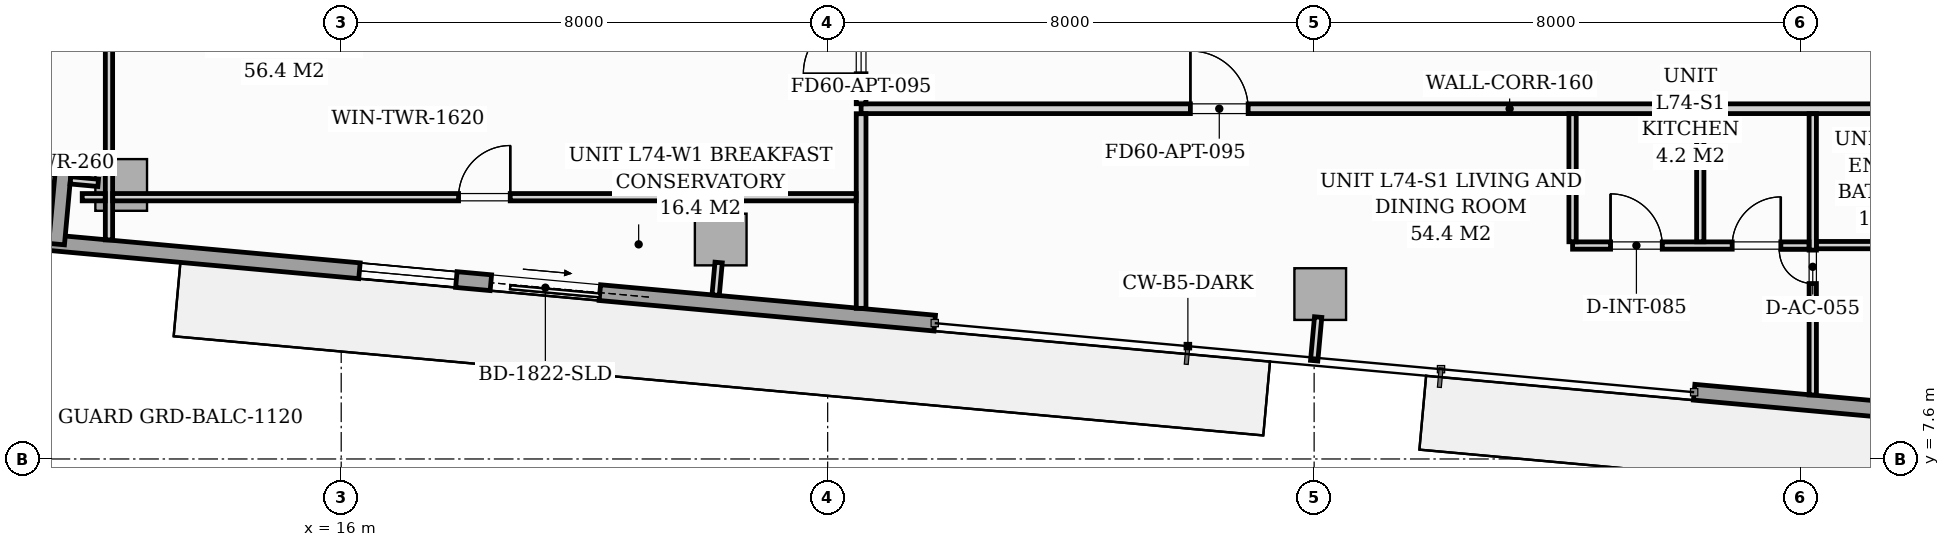
"""IFC4 building model, lengths in metres.
Left out: names, types, materials, properties, quantities, classifications, styles, units other than length and angle.
Written with IfcOpenShell. Run it as: python <this file> out.ifc"""

import sys

from ifc_helpers import new_model, si_unit, direction, frame, frame_2d, origin, origin_2d, place, context, subcontext, project, spatial, rectangle, extrude, source, transform, mapped, element, fill, save


model = new_model("IFC4")
c1 = context("Model", 3, precision=1e-05, world=origin(), true_north=direction((0.0, 1.0)))
c2 = subcontext(c1, "Body", "Model", "MODEL_VIEW")
j1 = project(units=[si_unit("LENGTHUNIT", "METRE"), si_unit("PLANEANGLEUNIT", "RADIAN")], contexts=[c1])
p1 = place(None, origin())
s1 = spatial("IfcSite", under=j1, at=p1, CompositionType="ELEMENT")
p2 = place(p1, origin())
s2 = spatial("IfcBuilding", under=s1, at=p2, CompositionType="ELEMENT")
p3 = place(p2, frame((0.0, 0.0, 256.2)))
s3 = spatial("IfcBuildingStorey", under=s2, at=p3, CompositionType="ELEMENT", Elevation=256.2)
m1 = source(origin(), c2, "Body", "SweptSolid", [
    extrude(rectangle(XDim=0.85, YDim=0.85, at=origin_2d()), origin(), (0.0, 0.0, 1.0), 3.294),
])
for number, where, z_axis, x_axis in (
    (1, (12.382, 12.106, 0.002), (0.0, 0.0, 1.0), (0.996, -0.091, 0.0)),
    (2, (22.241, 11.209, 0.002), (0.0, 0.0, 1.0), (0.996, -0.091, 0.0)),
    (3, (32.1, 10.312, 0.002), (0.0, 0.0, 1.0), (0.996, -0.091, 0.0)),
):
    element("IfcColumn", number, at=place(p3, frame(where, z_axis=z_axis, x_axis=x_axis)), inside=s3, PredefinedType="COLUMN", context=c2, shape_type="MappedRepresentation", body=[
        mapped(m1, transform((0.0, 0.0, 0.0), scale=1.0)),
    ])
p4 = place(p3, frame((11.319, 12.404, 0.0), z_axis=(0.0, 0.0, 1.0), x_axis=(-0.995881721538, 0.090661991521, 0.0)))
e4 = element("IfcWall", 4, at=p4, inside=s3, PredefinedType="STANDARD", context=c2, shape_type="SweptSolid", body=[
    extrude(rectangle(XDim=1.395, YDim=0.26, at=frame_2d((0.698, 0.0))), origin(), (0.0, 0.0, 1.0), 3.0),
])
p5 = place(p3, frame((52.819, 7.372, 0.0), z_axis=(0.0, 0.0, 1.0), x_axis=(-0.995884447498, 0.090632043071, 0.0)))
e5 = element("IfcWall", 5, at=p5, inside=s3, PredefinedType="STANDARD", context=c2, shape_type="SweptSolid", body=[
    extrude(rectangle(XDim=14.63, YDim=0.26, at=frame_2d((7.315, 0.0))), origin(), (0.0, 0.0, 1.0), 3.0),
])
p6 = place(p5, frame((7.471, 0.0, 0.0)))
e6 = element("IfcOpeningElement", 6, at=p6, cuts=e5, PredefinedType="OPENING", context=c2, shape_type="SweptSolid", body=[
    extrude(rectangle(XDim=1.8, YDim=2.06, at=frame_2d((0.9, 1.03))), frame((0.0, 0.14, 0.0), z_axis=(0.0, -1.0, 0.0), x_axis=(1.0, 0.0, 0.0)), (0.0, 0.0, 1.0), 0.28),
])
p7 = place(p5, frame((2.05, 0.0, 0.65)))
e7 = element("IfcOpeningElement", 7, at=p7, cuts=e5, PredefinedType="OPENING", context=c2, shape_type="SweptSolid", body=[
    extrude(rectangle(XDim=1.6, YDim=1.5, at=frame_2d((0.8, 0.75))), frame((0.0, 0.14, 0.0), z_axis=(0.0, -1.0, 0.0), x_axis=(1.0, 0.0, 0.0)), (0.0, 0.0, 1.0), 0.28),
])
p8 = place(p3, frame((25.761, 9.834, 0.0), z_axis=(0.0, 0.0, 1.0), x_axis=(-0.995884584572, 0.090630536861, 0.0)))
e8 = element("IfcWall", 8, at=p8, inside=s3, PredefinedType="STANDARD", context=c2, shape_type="SweptSolid", body=[
    extrude(rectangle(XDim=14.63, YDim=0.26, at=frame_2d((7.315, 0.0))), origin(), (0.0, 0.0, 1.0), 3.0),
])
p9 = place(p8, frame((5.53, 0.0, 0.0)))
e9 = element("IfcOpeningElement", 9, at=p9, cuts=e8, PredefinedType="OPENING", context=c2, shape_type="SweptSolid", body=[
    extrude(rectangle(XDim=1.8, YDim=2.06, at=frame_2d((0.9, 1.03))), frame((0.0, 0.14, 0.0), z_axis=(0.0, -1.0, 0.0), x_axis=(1.0, 0.0, 0.0)), (0.0, 0.0, 1.0), 0.28),
])
p10 = place(p8, frame((7.9, 0.0, 0.65)))
e10 = element("IfcOpeningElement", 10, at=p10, cuts=e8, PredefinedType="OPENING", context=c2, shape_type="SweptSolid", body=[
    extrude(rectangle(XDim=1.6, YDim=1.5, at=frame_2d((0.8, 0.75))), frame((0.0, 0.14, 0.0), z_axis=(0.0, -1.0, 0.0), x_axis=(1.0, 0.0, 0.0)), (0.0, 0.0, 1.0), 0.28),
])
p11 = place(p3, frame((11.319, 11.134, 0.0), z_axis=(0.0, 0.0, 1.0), x_axis=(0.090661991521, 0.995881721538, 0.0)))
e11 = element("IfcWall", 11, at=p11, inside=s3, PredefinedType="STANDARD", context=c2, shape_type="SweptSolid", body=[
    extrude(rectangle(XDim=1.395, YDim=0.26, at=frame_2d((0.698, 0.0))), origin(), (0.0, 0.0, 1.0), 3.0),
])
p12 = place(p3, frame((24.55, 13.36, 0.0), z_axis=(0.0, 0.0, 1.0), x_axis=(1.0, 0.0, 0.0)))
e12 = element("IfcWall", 12, at=p12, inside=s3, PredefinedType="PARTITIONING", context=c2, shape_type="SweptSolid", body=[
    extrude(rectangle(XDim=21.33, YDim=0.16, at=frame_2d((10.665, 0.0))), origin(), (0.0, 0.0, 1.0), 2.51),
])
p13 = place(p12, frame((5.415, 0.0, 0.0)))
e13 = element("IfcOpeningElement", 13, at=p13, cuts=e12, PredefinedType="OPENING", context=c2, shape_type="SweptSolid", body=[
    extrude(rectangle(XDim=0.95, YDim=2.06, at=frame_2d((0.475, 1.03))), frame((0.0, 0.09, 0.0), z_axis=(0.0, -1.0, 0.0), x_axis=(1.0, 0.0, 0.0)), (0.0, 0.0, 1.0), 0.18),
])
p14 = place(p3, frame((24.55, 10.077, 0.0), z_axis=(0.0, 0.0, 1.0), x_axis=(0.0, 1.0, 0.0)))
e14 = element("IfcWall", 14, at=p14, inside=s3, PredefinedType="PARTITIONING", context=c2, shape_type="SweptSolid", body=[
    extrude(rectangle(XDim=3.201, YDim=0.16, at=frame_2d((1.601, 0.0))), origin(), (0.0, 0.0, 1.0), 3.0),
])
p15 = place(p3, frame((24.55, 13.442, 0.0), z_axis=(0.0, 0.0, 1.0), x_axis=(0.0, 1.0, 0.0)))
e15 = element("IfcWall", 15, at=p15, inside=s3, PredefinedType="PARTITIONING", context=c2, shape_type="SweptSolid", body=[
    extrude(rectangle(XDim=7.208, YDim=0.16, at=frame_2d((3.604, 0.0))), origin(), (0.0, 0.0, 1.0), 3.0),
])
p16 = place(p15, frame((0.493, 0.0, 0.0)))
e16 = element("IfcOpeningElement", 16, at=p16, cuts=e15, PredefinedType="OPENING", context=c2, shape_type="SweptSolid", body=[
    extrude(rectangle(XDim=0.95, YDim=2.06, at=frame_2d((0.475, 1.03))), frame((0.0, 0.09, 0.0), z_axis=(0.0, -1.0, 0.0), x_axis=(1.0, 0.0, 0.0)), (0.0, 0.0, 1.0), 0.18),
])
p17 = place(p15, frame((5.949, 0.0, 0.0)))
e17 = element("IfcOpeningElement", 17, at=p17, cuts=e15, PredefinedType="OPENING", context=c2, shape_type="SweptSolid", body=[
    extrude(rectangle(XDim=0.95, YDim=2.06, at=frame_2d((0.475, 1.03))), frame((0.0, 0.09, 0.0), z_axis=(0.0, -1.0, 0.0), x_axis=(1.0, 0.0, 0.0)), (0.0, 0.0, 1.0), 0.18),
])
p18 = place(p3, frame((40.2, 8.653, 0.0), z_axis=(0.0, 0.0, 1.0), x_axis=(0.0, 1.0, 0.0)))
e18 = element("IfcWall", 18, at=p18, inside=s3, PredefinedType="PARTITIONING", context=c2, shape_type="SweptSolid", body=[
    extrude(rectangle(XDim=4.625, YDim=0.12, at=frame_2d((2.312, 0.0))), origin(), (0.0, 0.0, 1.0), 3.0),
])
p19 = place(p18, frame((1.832, 0.0, 0.0)))
e19 = element("IfcOpeningElement", 19, at=p19, cuts=e18, PredefinedType="OPENING", context=c2, shape_type="SweptSolid", body=[
    extrude(rectangle(XDim=0.55, YDim=2.0, at=frame_2d((0.275, 1.0))), frame((0.0, 0.07, 0.0), z_axis=(0.0, -1.0, 0.0), x_axis=(1.0, 0.0, 0.0)), (0.0, 0.0, 1.0), 0.14),
])
p20 = place(p3, frame((36.25, 11.11, 0.0), z_axis=(0.0, 0.0, 1.0), x_axis=(1.0, 0.0, 0.0)))
e20 = element("IfcWall", 20, at=p20, inside=s3, PredefinedType="PARTITIONING", context=c2, shape_type="SweptSolid", body=[
    extrude(rectangle(XDim=3.888, YDim=0.12, at=frame_2d((1.944, 0.0))), origin(), (0.0, 0.0, 1.0), 3.0),
])
p21 = place(p20, frame((0.625, 0.0, 0.0)))
e21 = element("IfcOpeningElement", 21, at=p21, cuts=e20, PredefinedType="OPENING", context=c2, shape_type="SweptSolid", body=[
    extrude(rectangle(XDim=0.85, YDim=2.05, at=frame_2d((0.425, 1.025))), frame((0.0, 0.07, 0.0), z_axis=(0.0, -1.0, 0.0), x_axis=(1.0, 0.0, 0.0)), (0.0, 0.0, 1.0), 0.14),
])
p22 = place(p20, frame((2.625, 0.0, 0.0)))
e22 = element("IfcOpeningElement", 22, at=p22, cuts=e20, PredefinedType="OPENING", context=c2, shape_type="SweptSolid", body=[
    extrude(rectangle(XDim=0.8, YDim=2.02, at=frame_2d((0.4, 1.01))), frame((0.0, 0.07, 0.0), z_axis=(0.0, -1.0, 0.0), x_axis=(1.0, 0.0, 0.0)), (0.0, 0.0, 1.0), 0.14),
])
for number, where, z_axis, x_axis in (
    (23, (38.35, 11.172, 0.0), (0.0, 0.0, 1.0), (0.0, 1.0, 0.0)),
    (24, (36.25, 11.172, 0.0), (0.0, 0.0, 1.0), (0.0, 1.0, 0.0)),
):
    element("IfcWall", number, at=place(p3, frame(where, z_axis=z_axis, x_axis=x_axis)), inside=s3, PredefinedType="PARTITIONING", context=c2, shape_type="SweptSolid", body=[
        extrude(rectangle(XDim=2.106, YDim=0.12, at=frame_2d((1.053, 0.0))), origin(), (0.0, 0.0, 1.0), 3.0),
    ])
p23 = place(p3, frame((40.262, 11.117, 0.0), z_axis=(0.0, 0.0, 1.0), x_axis=(1.0, 0.0, 0.0)))
e25 = element("IfcWall", 25, at=p23, inside=s3, PredefinedType="PARTITIONING", context=c2, shape_type="SweptSolid", body=[
    extrude(rectangle(XDim=5.536, YDim=0.12, at=frame_2d((2.768, 0.0))), origin(), (0.0, 0.0, 1.0), 3.0),
])
p24 = place(p23, frame((2.528, 0.0, 0.0)))
e26 = element("IfcOpeningElement", 26, at=p24, cuts=e25, PredefinedType="OPENING", context=c2, shape_type="SweptSolid", body=[
    extrude(rectangle(XDim=0.8, YDim=2.02, at=frame_2d((0.4, 1.01))), frame((0.0, 0.07, 0.0), z_axis=(0.0, -1.0, 0.0), x_axis=(1.0, 0.0, 0.0)), (0.0, 0.0, 1.0), 0.14),
])
p25 = place(p3, frame((12.181, 11.203, 0.0), z_axis=(0.0, 0.0, 1.0), x_axis=(0.0, 1.0, 0.0)))
e27 = element("IfcWall", 27, at=p25, inside=s3, PredefinedType="PARTITIONING", context=c2, shape_type="SweptSolid", body=[
    extrude(rectangle(XDim=7.945, YDim=0.12, at=frame_2d((3.973, 0.0))), origin(), (0.0, 0.0, 1.0), 2.443),
])
p26 = place(p25, frame((4.059, 0.0, 0.0)))
e28 = element("IfcOpeningElement", 28, at=p26, cuts=e27, PredefinedType="OPENING", context=c2, shape_type="SweptSolid", body=[
    extrude(rectangle(XDim=0.85, YDim=2.05, at=frame_2d((0.425, 1.025))), frame((0.0, 0.07, 0.0), z_axis=(0.0, -1.0, 0.0), x_axis=(1.0, 0.0, 0.0)), (0.0, 0.0, 1.0), 0.14),
])
p27 = place(p3, frame((11.741, 11.905, 0.0), z_axis=(0.0, 0.0, 1.0), x_axis=(1.0, 0.0, 0.0)))
e29 = element("IfcWall", 29, at=p27, inside=s3, PredefinedType="PARTITIONING", context=c2, shape_type="SweptSolid", body=[
    extrude(rectangle(XDim=0.378, YDim=0.12, at=frame_2d((0.189, 0.0))), origin(), (0.0, 0.0, 1.0), 3.0),
])
p28 = place(p3, frame((12.243, 11.905, 0.0), z_axis=(0.0, 0.0, 1.0), x_axis=(1.0, 0.0, 0.0)))
e30 = element("IfcWall", 30, at=p28, inside=s3, PredefinedType="PARTITIONING", context=c2, shape_type="SweptSolid", body=[
    extrude(rectangle(XDim=12.225, YDim=0.12, at=frame_2d((6.113, 0.0))), origin(), (0.0, 0.0, 1.0), 2.443),
])
p29 = place(p28, frame((5.687, 0.0, 0.0)))
e31 = element("IfcOpeningElement", 31, at=p29, cuts=e30, PredefinedType="OPENING", context=c2, shape_type="SweptSolid", body=[
    extrude(rectangle(XDim=0.85, YDim=2.05, at=frame_2d((0.425, 1.025))), frame((0.0, 0.07, 0.0), z_axis=(0.0, -1.0, 0.0), x_axis=(1.0, 0.0, 0.0)), (0.0, 0.0, 1.0), 0.14),
])
p30 = place(p3, frame((12.003, 12.141, 0.0), z_axis=(0.0, 0.0, 1.0), x_axis=(-0.995884462012, 0.090631883588, 0.0)))
e32 = element("IfcWall", 32, at=p30, inside=s3, PredefinedType="PARTITIONING", context=c2, shape_type="SweptSolid", body=[
    extrude(rectangle(XDim=0.458, YDim=0.12, at=frame_2d((0.229, 0.0))), origin(), (0.0, 0.0, 1.0), 3.0),
])
p31 = place(p3, frame((22.207, 10.831, 0.0), z_axis=(0.0, 0.0, 1.0), x_axis=(-0.090781299264, -0.995870852924, 0.0)))
e33 = element("IfcWall", 33, at=p31, inside=s3, PredefinedType="PARTITIONING", context=c2, shape_type="SweptSolid", body=[
    extrude(rectangle(XDim=0.538, YDim=0.12, at=frame_2d((0.269, 0.0))), origin(), (0.0, 0.0, 1.0), 3.0),
])
p32 = place(p3, frame((32.066, 9.933, 0.0), z_axis=(0.0, 0.0, 1.0), x_axis=(-0.090872036342, -0.995862577373, 0.0)))
e34 = element("IfcWall", 34, at=p32, inside=s3, PredefinedType="PARTITIONING", context=c2, shape_type="SweptSolid", body=[
    extrude(rectangle(XDim=0.72, YDim=0.12, at=frame_2d((0.36, 0.0))), origin(), (0.0, 0.0, 1.0), 3.0),
])
m2 = source(origin(), c2, "Body", "SweptSolid", [
    extrude(rectangle(XDim=1.8, YDim=2.06, at=frame_2d((0.9, 1.03))), frame((0.0, 0.025, 0.0), z_axis=(0.0, -1.0, 0.0), x_axis=(1.0, 0.0, 0.0)), (0.0, 0.0, 1.0), 0.05),
])
p33 = place(p9, origin())
e35 = element("IfcDoor", 35, at=p33, inside=s3, OperationType="SLIDING_TO_LEFT", PredefinedType="DOOR", context=c2, shape_type="MappedRepresentation", body=[
    mapped(m2, transform((0.0, 0.0, 0.0), scale=1.0)),
])
fill(e9, e35)
m3 = source(origin(), c2, "Body", "SweptSolid", [
    extrude(rectangle(XDim=1.6, YDim=1.5, at=frame_2d((0.8, 0.75))), frame((0.0, 0.03, 0.0), z_axis=(0.0, -1.0, 0.0), x_axis=(1.0, 0.0, 0.0)), (0.0, 0.0, 1.0), 0.06),
])
p34 = place(p10, origin())
e36 = element("IfcWindow", 36, at=p34, inside=s3, PartitioningType="SINGLE_PANEL", PredefinedType="WINDOW", context=c2, shape_type="MappedRepresentation", body=[
    mapped(m3, transform((0.0, 0.0, 0.0), scale=1.0)),
])
fill(e10, e36)
m4 = source(origin(), c2, "Body", "SweptSolid", [
    extrude(rectangle(XDim=0.95, YDim=2.06, at=frame_2d((0.475, 1.03))), frame((0.0, 0.025, 0.0), z_axis=(0.0, -1.0, 0.0), x_axis=(1.0, 0.0, 0.0)), (0.0, 0.0, 1.0), 0.05),
])
p35 = place(p13, origin())
e37 = element("IfcDoor", 37, at=p35, inside=s3, OperationType="SINGLE_SWING_LEFT", PredefinedType="DOOR", context=c2, shape_type="MappedRepresentation", body=[
    mapped(m4, transform((0.0, 0.0, 0.0), scale=1.0)),
])
fill(e13, e37)
m5 = source(origin(), c2, "Body", "SweptSolid", [
    extrude(rectangle(XDim=0.55, YDim=2.0, at=frame_2d((0.275, 1.0))), frame((0.0, 0.025, 0.0), z_axis=(0.0, -1.0, 0.0), x_axis=(1.0, 0.0, 0.0)), (0.0, 0.0, 1.0), 0.05),
])
p36 = place(p19, origin())
e38 = element("IfcDoor", 38, at=p36, inside=s3, OperationType="SINGLE_SWING_RIGHT", PredefinedType="DOOR", context=c2, shape_type="MappedRepresentation", body=[
    mapped(m5, transform((0.0, 0.0, 0.0), scale=1.0)),
])
fill(e19, e38)
m6 = source(origin(), c2, "Body", "SweptSolid", [
    extrude(rectangle(XDim=0.85, YDim=2.05, at=frame_2d((0.425, 1.025))), frame((0.0, 0.025, 0.0), z_axis=(0.0, -1.0, 0.0), x_axis=(1.0, 0.0, 0.0)), (0.0, 0.0, 1.0), 0.05),
])
p37 = place(p21, origin())
e39 = element("IfcDoor", 39, at=p37, inside=s3, OperationType="SINGLE_SWING_LEFT", PredefinedType="DOOR", context=c2, shape_type="MappedRepresentation", body=[
    mapped(m6, transform((0.0, 0.0, 0.0), scale=1.0)),
])
fill(e21, e39)
m7 = source(origin(), c2, "Body", "SweptSolid", [
    extrude(rectangle(XDim=0.8, YDim=2.02, at=frame_2d((0.4, 1.01))), frame((0.0, 0.025, 0.0), z_axis=(0.0, -1.0, 0.0), x_axis=(1.0, 0.0, 0.0)), (0.0, 0.0, 1.0), 0.05),
])
p38 = place(p22, origin())
e40 = element("IfcDoor", 40, at=p38, inside=s3, OperationType="SINGLE_SWING_RIGHT", PredefinedType="DOOR", context=c2, shape_type="MappedRepresentation", body=[
    mapped(m7, transform((0.0, 0.0, 0.0), scale=1.0)),
])
fill(e22, e40)
p39 = place(p16, origin())
e41 = element("IfcDoor", 41, at=p39, inside=s3, OperationType="SINGLE_SWING_LEFT", PredefinedType="DOOR", context=c2, shape_type="MappedRepresentation", body=[
    mapped(m4, transform((0.0, 0.0, 0.0), scale=1.0)),
])
fill(e16, e41)
p40 = place(p29, origin())
e42 = element("IfcDoor", 42, at=p40, inside=s3, OperationType="SINGLE_SWING_RIGHT", PredefinedType="DOOR", context=c2, shape_type="MappedRepresentation", body=[
    mapped(m6, transform((0.0, 0.0, 0.0), scale=1.0)),
])
fill(e31, e42)
save(model, sys.argv[1])
